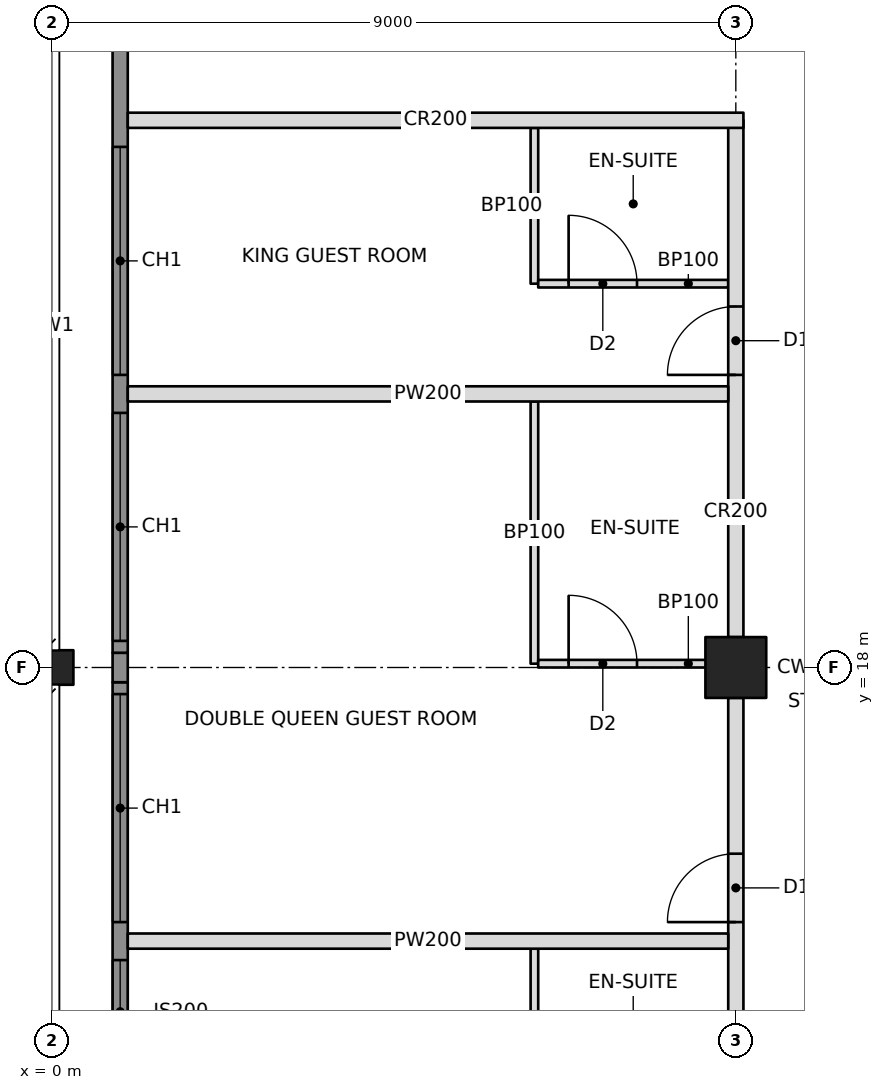
"""IFC4 building model, lengths in metres.
Left out: names, types, materials, properties, quantities, classifications, styles, units other than length and angle.
Written with IfcOpenShell. Run it as: python <this file> out.ifc"""

import sys

from ifc_helpers import new_model, si_unit, direction, frame, frame_2d, origin, origin_2d, place, context, subcontext, project, spatial, rectangle, hollow_rectangle, i_section, extrude, element, fill, save


model = new_model("IFC4")
c1 = context("Model", 3, precision=1e-05, world=origin(), true_north=direction((0.0, 1.0)))
c2 = subcontext(c1, "Body", "Model", "MODEL_VIEW")
j1 = project(units=[si_unit("LENGTHUNIT", "METRE"), si_unit("PLANEANGLEUNIT", "RADIAN")], contexts=[c1])
p1 = place(None, origin())
s1 = spatial("IfcSite", under=j1, at=p1, CompositionType="ELEMENT")
p2 = place(p1, origin())
s2 = spatial("IfcBuilding", under=s1, at=p2, CompositionType="ELEMENT")
p3 = place(p2, frame((0.0, 0.0, 82.4)))
s3 = spatial("IfcBuildingStorey", under=s2, at=p3, CompositionType="ELEMENT", Elevation=82.4)
p4 = place(p3, frame((0.0, 18.0, 0.0), z_axis=(0.0, 0.0, 1.0), x_axis=(0.0, 1.0, 0.0)))
e1 = element("IfcColumn", 1, at=p4, inside=s3, PredefinedType="COLUMN", context=c2, shape_type="SweptSolid", body=[
    extrude(i_section(OverallWidth=0.455, OverallDepth=0.569, WebThickness=0.078, FlangeThickness=0.125, at=origin_2d()), origin(), (0.0, 0.0, 1.0), 3.4),
])
p5 = place(p3, frame((9.0, 18.0, 0.0), z_axis=(0.0, 0.0, 1.0), x_axis=(1.0, 0.0, 0.0)))
e2 = element("IfcColumn", 2, at=p5, inside=s3, PredefinedType="COLUMN", context=c2, shape_type="SweptSolid", body=[
    extrude(hollow_rectangle(XDim=0.8, YDim=0.8, WallThickness=0.09, at=origin_2d()), origin(), (0.0, 0.0, 1.0), 3.4),
])
p6 = place(p3, frame((9.0, 10.8, 0.0), z_axis=(0.0, 0.0, 1.0), x_axis=(0.0, 1.0, 0.0)))
e3 = element("IfcWall", 3, at=p6, inside=s3, PredefinedType="PARTITIONING", context=c2, shape_type="SweptSolid", body=[
    extrude(rectangle(XDim=6.8, YDim=0.2, at=frame_2d((3.4, 0.0))), origin(), (0.0, 0.0, 1.0), 2.405),
])
p7 = place(p6, frame((0.25, 0.0, 0.0)))
e4 = element("IfcOpeningElement", 4, at=p7, cuts=e3, PredefinedType="OPENING", context=c2, shape_type="SweptSolid", body=[
    extrude(rectangle(XDim=0.9, YDim=2.1, at=frame_2d((0.45, 1.05))), frame((0.0, 0.11, 0.0), z_axis=(0.0, -1.0, 0.0), x_axis=(1.0, 0.0, 0.0)), (0.0, 0.0, 1.0), 0.22),
])
p8 = place(p6, frame((3.85, 0.0, 0.0)))
e5 = element("IfcOpeningElement", 5, at=p8, cuts=e3, PredefinedType="OPENING", context=c2, shape_type="SweptSolid", body=[
    extrude(rectangle(XDim=0.9, YDim=2.1, at=frame_2d((0.45, 1.05))), frame((0.0, 0.11, 0.0), z_axis=(0.0, -1.0, 0.0), x_axis=(1.0, 0.0, 0.0)), (0.0, 0.0, 1.0), 0.22),
])
p9 = place(p3, frame((9.0, 18.4, 0.0), z_axis=(0.0, 0.0, 1.0), x_axis=(0.0, 1.0, 0.0)))
e6 = element("IfcWall", 6, at=p9, inside=s3, PredefinedType="PARTITIONING", context=c2, shape_type="SweptSolid", body=[
    extrude(rectangle(XDim=6.8, YDim=0.2, at=frame_2d((3.4, 0.0))), origin(), (0.0, 0.0, 1.0), 2.405),
])
p10 = place(p9, frame((3.45, 0.0, 0.0)))
e7 = element("IfcOpeningElement", 7, at=p10, cuts=e6, PredefinedType="OPENING", context=c2, shape_type="SweptSolid", body=[
    extrude(rectangle(XDim=0.9, YDim=2.1, at=frame_2d((0.45, 1.05))), frame((0.0, 0.11, 0.0), z_axis=(0.0, -1.0, 0.0), x_axis=(1.0, 0.0, 0.0)), (0.0, 0.0, 1.0), 0.22),
])
p11 = place(p3, frame((1.0, 25.2, 0.0), z_axis=(0.0, 0.0, 1.0), x_axis=(1.0, 0.0, 0.0)))
e8 = element("IfcWall", 8, at=p11, inside=s3, PredefinedType="PARTITIONING", context=c2, shape_type="SweptSolid", body=[
    extrude(rectangle(XDim=8.1, YDim=0.2, at=frame_2d((4.05, 0.0))), origin(), (0.0, 0.0, 1.0), 2.404),
])
for number, where, z_axis, x_axis in (
    (9, (8.9, 14.4, 0.0), (0.0, 0.0, 1.0), (-1.0, 0.0, 0.0)),
    (10, (8.9, 21.6, 0.0), (0.0, 0.0, 1.0), (-1.0, 0.0, 0.0)),
):
    element("IfcWall", number, at=place(p3, frame(where, z_axis=z_axis, x_axis=x_axis)), inside=s3, PredefinedType="PARTITIONING", context=c2, shape_type="SweptSolid", body=[
        extrude(rectangle(XDim=7.9, YDim=0.2, at=frame_2d((3.95, 0.0))), origin(), (0.0, 0.0, 1.0), 2.404),
    ])
p12 = place(p3, frame((6.35, 12.25, 0.0), z_axis=(0.0, 0.0, 1.0), x_axis=(0.0, 1.0, 0.0)))
e11 = element("IfcWall", 11, at=p12, inside=s3, PredefinedType="PARTITIONING", context=c2, shape_type="SweptSolid", body=[
    extrude(rectangle(XDim=2.05, YDim=0.1, at=frame_2d((1.025, 0.0))), origin(), (0.0, 0.0, 1.0), 3.2),
])
p13 = place(p3, frame((6.35, 18.05, 0.0), z_axis=(0.0, 0.0, 1.0), x_axis=(0.0, 1.0, 0.0)))
e12 = element("IfcWall", 12, at=p13, inside=s3, PredefinedType="PARTITIONING", context=c2, shape_type="SweptSolid", body=[
    extrude(rectangle(XDim=3.45, YDim=0.1, at=frame_2d((1.725, 0.0))), origin(), (0.0, 0.0, 1.0), 2.404),
])
p14 = place(p3, frame((8.9, 18.05, 0.0), z_axis=(0.0, 0.0, 1.0), x_axis=(-1.0, 0.0, 0.0)))
e13 = element("IfcWall", 13, at=p14, inside=s3, PredefinedType="PARTITIONING", context=c2, shape_type="SweptSolid", body=[
    extrude(rectangle(XDim=2.5, YDim=0.1, at=frame_2d((1.25, 0.0))), origin(), (0.0, 0.0, 1.0), 2.405),
])
p15 = place(p14, frame((1.2, 0.0, 0.0)))
e14 = element("IfcOpeningElement", 14, at=p15, cuts=e13, PredefinedType="OPENING", context=c2, shape_type="SweptSolid", body=[
    extrude(rectangle(XDim=0.9, YDim=2.1, at=frame_2d((0.45, 1.05))), frame((0.0, 0.06, 0.0), z_axis=(0.0, -1.0, 0.0), x_axis=(1.0, 0.0, 0.0)), (0.0, 0.0, 1.0), 0.12),
])
p16 = place(p3, frame((6.35, 23.05, 0.0), z_axis=(0.0, 0.0, 1.0), x_axis=(0.0, 1.0, 0.0)))
e15 = element("IfcWall", 15, at=p16, inside=s3, PredefinedType="PARTITIONING", context=c2, shape_type="SweptSolid", body=[
    extrude(rectangle(XDim=2.05, YDim=0.1, at=frame_2d((1.025, 0.0))), origin(), (0.0, 0.0, 1.0), 3.2),
])
p17 = place(p3, frame((8.9, 23.05, 0.0), z_axis=(0.0, 0.0, 1.0), x_axis=(-1.0, 0.0, 0.0)))
e16 = element("IfcWall", 16, at=p17, inside=s3, PredefinedType="PARTITIONING", context=c2, shape_type="SweptSolid", body=[
    extrude(rectangle(XDim=2.5, YDim=0.1, at=frame_2d((1.25, 0.0))), origin(), (0.0, 0.0, 1.0), 2.404),
])
p18 = place(p17, frame((1.2, 0.0, 0.0)))
e17 = element("IfcOpeningElement", 17, at=p18, cuts=e16, PredefinedType="OPENING", context=c2, shape_type="SweptSolid", body=[
    extrude(rectangle(XDim=0.9, YDim=2.1, at=frame_2d((0.45, 1.05))), frame((0.0, 0.06, 0.0), z_axis=(0.0, -1.0, 0.0), x_axis=(1.0, 0.0, 0.0)), (0.0, 0.0, 1.0), 0.12),
])
p19 = place(p3, frame((0.9, 9.135, 0.0), z_axis=(0.0, 0.0, 1.0), x_axis=(0.0, 1.0, 0.0)))
e18 = element("IfcWall", 18, at=p19, inside=s3, PredefinedType="SOLIDWALL", context=c2, shape_type="SweptSolid", body=[
    extrude(rectangle(XDim=8.671, YDim=0.2, at=frame_2d((4.335, 0.0))), origin(), (0.0, 0.0, 1.0), 3.2),
])
p20 = place(p19, frame((2.015, 0.0, 0.6)))
e19 = element("IfcOpeningElement", 19, at=p20, cuts=e18, PredefinedType="OPENING", context=c2, shape_type="SweptSolid", body=[
    extrude(rectangle(XDim=3.0, YDim=2.2, at=frame_2d((1.5, 1.1))), frame((0.0, 0.11, 0.0), z_axis=(0.0, -1.0, 0.0), x_axis=(1.0, 0.0, 0.0)), (0.0, 0.0, 1.0), 0.22),
])
p21 = place(p19, frame((5.515, 0.0, 0.6)))
e20 = element("IfcOpeningElement", 20, at=p21, cuts=e18, PredefinedType="OPENING", context=c2, shape_type="SweptSolid", body=[
    extrude(rectangle(XDim=3.0, YDim=2.2, at=frame_2d((1.5, 1.1))), frame((0.0, 0.11, 0.0), z_axis=(0.0, -1.0, 0.0), x_axis=(1.0, 0.0, 0.0)), (0.0, 0.0, 1.0), 0.22),
])
p22 = place(p3, frame((0.9, 17.806, 0.0), z_axis=(0.0, 0.0, 1.0), x_axis=(0.0, 1.0, 0.0)))
e21 = element("IfcWall", 21, at=p22, inside=s3, PredefinedType="SOLIDWALL", context=c2, shape_type="SweptSolid", body=[
    extrude(rectangle(XDim=0.388, YDim=0.2, at=frame_2d((0.194, 0.0))), origin(), (0.0, 0.0, 1.0), 2.404),
])
p23 = place(p3, frame((0.9, 18.194, 0.0), z_axis=(0.0, 0.0, 1.0), x_axis=(0.0, 1.0, 0.0)))
e22 = element("IfcWall", 22, at=p23, inside=s3, PredefinedType="SOLIDWALL", context=c2, shape_type="SweptSolid", body=[
    extrude(rectangle(XDim=8.671, YDim=0.2, at=frame_2d((4.335, 0.0))), origin(), (0.0, 0.0, 1.0), 3.2),
])
p24 = place(p23, frame((0.156, 0.0, 0.6)))
e23 = element("IfcOpeningElement", 23, at=p24, cuts=e22, PredefinedType="OPENING", context=c2, shape_type="SweptSolid", body=[
    extrude(rectangle(XDim=3.0, YDim=2.2, at=frame_2d((1.5, 1.1))), frame((0.0, 0.11, 0.0), z_axis=(0.0, -1.0, 0.0), x_axis=(1.0, 0.0, 0.0)), (0.0, 0.0, 1.0), 0.22),
])
p25 = place(p23, frame((3.656, 0.0, 0.6)))
e24 = element("IfcOpeningElement", 24, at=p25, cuts=e22, PredefinedType="OPENING", context=c2, shape_type="SweptSolid", body=[
    extrude(rectangle(XDim=3.0, YDim=2.2, at=frame_2d((1.5, 1.1))), frame((0.0, 0.11, 0.0), z_axis=(0.0, -1.0, 0.0), x_axis=(1.0, 0.0, 0.0)), (0.0, 0.0, 1.0), 0.22),
])
p26 = place(p20, origin())
e25 = element("IfcWindow", 25, at=p26, inside=s3, PartitioningType="TRIPLE_PANEL_VERTICAL", PredefinedType="WINDOW", context=c2, shape_type="SweptSolid", body=[
    extrude(rectangle(XDim=3.0, YDim=2.2, at=frame_2d((1.5, 1.1))), frame((0.0, 0.03, 0.0), z_axis=(0.0, -1.0, 0.0), x_axis=(1.0, 0.0, 0.0)), (0.0, 0.0, 1.0), 0.06),
])
fill(e19, e25)
p27 = place(p21, origin())
e26 = element("IfcWindow", 26, at=p27, inside=s3, PartitioningType="TRIPLE_PANEL_VERTICAL", PredefinedType="WINDOW", context=c2, shape_type="SweptSolid", body=[
    extrude(rectangle(XDim=3.0, YDim=2.2, at=frame_2d((1.5, 1.1))), frame((0.0, 0.03, 0.0), z_axis=(0.0, -1.0, 0.0), x_axis=(1.0, 0.0, 0.0)), (0.0, 0.0, 1.0), 0.06),
])
fill(e20, e26)
p28 = place(p24, origin())
e27 = element("IfcWindow", 27, at=p28, inside=s3, PartitioningType="TRIPLE_PANEL_VERTICAL", PredefinedType="WINDOW", context=c2, shape_type="SweptSolid", body=[
    extrude(rectangle(XDim=3.0, YDim=2.2, at=frame_2d((1.5, 1.1))), frame((0.0, 0.03, 0.0), z_axis=(0.0, -1.0, 0.0), x_axis=(1.0, 0.0, 0.0)), (0.0, 0.0, 1.0), 0.06),
])
fill(e23, e27)
p29 = place(p25, origin())
e28 = element("IfcWindow", 28, at=p29, inside=s3, PartitioningType="TRIPLE_PANEL_VERTICAL", PredefinedType="WINDOW", context=c2, shape_type="SweptSolid", body=[
    extrude(rectangle(XDim=3.0, YDim=2.2, at=frame_2d((1.5, 1.1))), frame((0.0, 0.03, 0.0), z_axis=(0.0, -1.0, 0.0), x_axis=(1.0, 0.0, 0.0)), (0.0, 0.0, 1.0), 0.06),
])
fill(e24, e28)
p30 = place(p15, frame((0.9, 0.0, 0.0), z_axis=(0.0, 0.0, 1.0), x_axis=(-1.0, 0.0, 0.0)))
e29 = element("IfcDoor", 29, at=p30, inside=s3, OperationType="SINGLE_SWING_LEFT", PredefinedType="DOOR", context=c2, shape_type="SweptSolid", body=[
    extrude(rectangle(XDim=0.9, YDim=2.1, at=frame_2d((0.45, 1.05))), frame((0.0, 0.025, 0.0), z_axis=(0.0, -1.0, 0.0), x_axis=(1.0, 0.0, 0.0)), (0.0, 0.0, 1.0), 0.05),
])
fill(e14, e29)
p31 = place(p8, origin())
e30 = element("IfcDoor", 30, at=p31, inside=s3, OperationType="SINGLE_SWING_LEFT", PredefinedType="DOOR", context=c2, shape_type="SweptSolid", body=[
    extrude(rectangle(XDim=0.9, YDim=2.1, at=frame_2d((0.45, 1.05))), frame((0.0, 0.025, 0.0), z_axis=(0.0, -1.0, 0.0), x_axis=(1.0, 0.0, 0.0)), (0.0, 0.0, 1.0), 0.05),
])
fill(e5, e30)
p32 = place(p18, frame((0.9, 0.0, 0.0), z_axis=(0.0, 0.0, 1.0), x_axis=(-1.0, 0.0, 0.0)))
e31 = element("IfcDoor", 31, at=p32, inside=s3, OperationType="SINGLE_SWING_LEFT", PredefinedType="DOOR", context=c2, shape_type="SweptSolid", body=[
    extrude(rectangle(XDim=0.9, YDim=2.1, at=frame_2d((0.45, 1.05))), frame((0.0, 0.025, 0.0), z_axis=(0.0, -1.0, 0.0), x_axis=(1.0, 0.0, 0.0)), (0.0, 0.0, 1.0), 0.05),
])
fill(e17, e31)
p33 = place(p10, origin())
e32 = element("IfcDoor", 32, at=p33, inside=s3, OperationType="SINGLE_SWING_LEFT", PredefinedType="DOOR", context=c2, shape_type="SweptSolid", body=[
    extrude(rectangle(XDim=0.9, YDim=2.1, at=frame_2d((0.45, 1.05))), frame((0.0, 0.025, 0.0), z_axis=(0.0, -1.0, 0.0), x_axis=(1.0, 0.0, 0.0)), (0.0, 0.0, 1.0), 0.05),
])
fill(e7, e32)
save(model, sys.argv[1])
